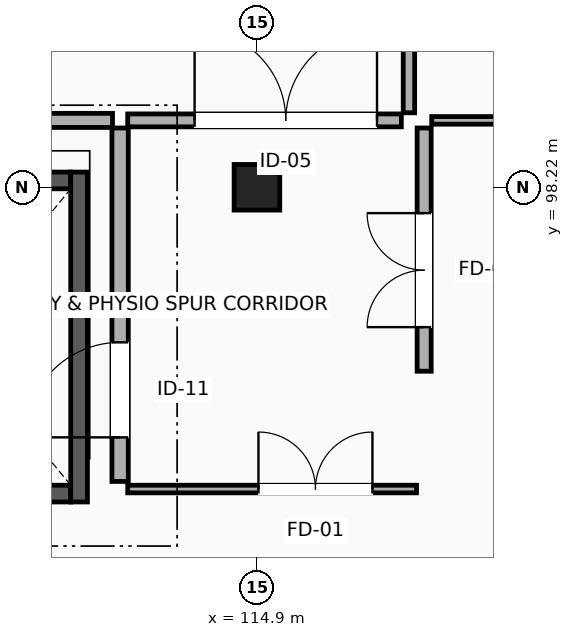
"""IFC4 building model, lengths in metres.
Left out: names, types, materials, properties, quantities, classifications, styles, units other than length and angle.
Written with IfcOpenShell. Run it as: python <this file> out.ifc"""

import sys

from ifc_helpers import new_model, si_unit, direction, frame, frame_2d, origin, origin_2d, place, context, subcontext, project, spatial, rectangle, extrude, element, fill, save


model = new_model("IFC4")
c1 = context("Model", 3, precision=1e-05, world=origin(), true_north=direction((0.0, 1.0)))
c2 = subcontext(c1, "Body", "Model", "MODEL_VIEW")
j1 = project(units=[si_unit("LENGTHUNIT", "METRE"), si_unit("PLANEANGLEUNIT", "RADIAN")], contexts=[c1])
p1 = place(None, origin())
s1 = spatial("IfcSite", under=j1, at=p1, CompositionType="ELEMENT")
p2 = place(p1, origin())
s2 = spatial("IfcBuilding", under=s1, at=p2, CompositionType="ELEMENT")
p3 = place(p2, frame((0.0, 0.0, 14.7)))
s3 = spatial("IfcBuildingStorey", under=s2, at=p3, CompositionType="ELEMENT", Elevation=14.7)
p4 = place(p3, frame((114.9, 98.22, 0.0), z_axis=(0.0, 0.0, 1.0), x_axis=(1.0, 0.0, 0.0)))
e1 = element("IfcColumn", 1, at=p4, inside=s3, PredefinedType="COLUMN", context=c2, shape_type="SweptSolid", body=[
    extrude(rectangle(XDim=0.6, YDim=0.6, at=origin_2d()), origin(), (0.0, 0.0, 1.0), 4.5),
])
p5 = place(p3, frame((109.25, 94.19, 0.0), z_axis=(0.0, 0.0, 1.0), x_axis=(1.0, 0.0, 0.0)))
e2 = element("IfcWall", 2, at=p5, inside=s3, PredefinedType="SOLIDWALL", context=c2, shape_type="SweptSolid", body=[
    extrude(rectangle(XDim=3.2, YDim=0.22, at=frame_2d((1.6, 0.0))), origin(), (0.0, 0.0, 1.0), 4.245),
])
p6 = place(p5, frame((0.5, 0.0, 0.0)))
e3 = element("IfcOpeningElement", 3, at=p6, cuts=e2, PredefinedType="OPENING", context=c2, shape_type="SweptSolid", body=[
    extrude(rectangle(XDim=2.2, YDim=2.6, at=frame_2d((1.1, 1.3))), frame((0.0, 0.12, 0.0), z_axis=(0.0, -1.0, 0.0), x_axis=(1.0, 0.0, 0.0)), (0.0, 0.0, 1.0), 0.24),
])
p7 = place(p3, frame((109.25, 98.31, 0.0), z_axis=(0.0, 0.0, 1.0), x_axis=(1.0, 0.0, 0.0)))
e4 = element("IfcWall", 4, at=p7, inside=s3, PredefinedType="SOLIDWALL", context=c2, shape_type="SweptSolid", body=[
    extrude(rectangle(XDim=3.2, YDim=0.22, at=frame_2d((1.6, 0.0))), origin(), (0.0, 0.0, 1.0), 3.427),
])
p8 = place(p3, frame((112.56, 94.08, 0.0), z_axis=(0.0, 0.0, 1.0), x_axis=(0.0, 1.0, 0.0)))
e5 = element("IfcWall", 5, at=p8, inside=s3, PredefinedType="SOLIDWALL", context=c2, shape_type="SweptSolid", body=[
    extrude(rectangle(XDim=4.34, YDim=0.22, at=frame_2d((2.17, 0.0))), origin(), (0.0, 0.0, 1.0), 3.427),
])
p9 = place(p3, frame((113.1, 94.35, 0.0), z_axis=(0.0, 0.0, 1.0), x_axis=(0.0, 1.0, 0.0)))
e6 = element("IfcWall", 6, at=p9, inside=s3, PredefinedType="PARTITIONING", context=c2, shape_type="SweptSolid", body=[
    extrude(rectangle(XDim=4.65, YDim=0.215, at=frame_2d((2.325, 0.0))), origin(), (0.0, 0.0, 1.0), 3.427),
])
p10 = place(p9, frame((0.58, 0.0, 0.0)))
e7 = element("IfcOpeningElement", 7, at=p10, cuts=e6, PredefinedType="OPENING", context=c2, shape_type="SweptSolid", body=[
    extrude(rectangle(XDim=1.25, YDim=2.15, at=frame_2d((0.625, 1.075))), frame((0.0, 0.117, 0.0), z_axis=(0.0, -1.0, 0.0), x_axis=(1.0, 0.0, 0.0)), (0.0, 0.0, 1.0), 0.235),
])
p11 = place(p3, frame((107.2, 99.1, 0.0), z_axis=(0.0, 0.0, 1.0), x_axis=(1.0, 0.0, 0.0)))
e8 = element("IfcWall", 8, at=p11, inside=s3, PredefinedType="PARTITIONING", context=c2, shape_type="SweptSolid", body=[
    extrude(rectangle(XDim=5.8, YDim=0.185, at=frame_2d((2.9, 0.0))), origin(), (0.0, 0.0, 1.0), 4.225),
])
p12 = place(p3, frame((113.2, 94.25, 0.0), z_axis=(0.0, 0.0, 1.0), x_axis=(1.0, 0.0, 0.0)))
e9 = element("IfcWall", 9, at=p12, inside=s3, PredefinedType="PARTITIONING", context=c2, shape_type="SweptSolid", body=[
    extrude(rectangle(XDim=3.8, YDim=0.1, at=frame_2d((1.9, 0.0))), origin(), (0.0, 0.0, 1.0), 3.917),
])
p13 = place(p12, frame((1.72, 0.0, 0.0)))
e10 = element("IfcOpeningElement", 10, at=p13, cuts=e9, PredefinedType="OPENING", context=c2, shape_type="SweptSolid", body=[
    extrude(rectangle(XDim=1.5, YDim=2.2, at=frame_2d((0.75, 1.1))), frame((0.0, 0.06, 0.0), z_axis=(0.0, -1.0, 0.0), x_axis=(1.0, 0.0, 0.0)), (0.0, 0.0, 1.0), 0.12),
])
p14 = place(p3, frame((117.1, 95.8, 0.0), z_axis=(0.0, 0.0, 1.0), x_axis=(0.0, 1.0, 0.0)))
e11 = element("IfcWall", 11, at=p14, inside=s3, PredefinedType="PARTITIONING", context=c2, shape_type="SweptSolid", body=[
    extrude(rectangle(XDim=3.2, YDim=0.185, at=frame_2d((1.6, 0.0))), origin(), (0.0, 0.0, 1.0), 3.727),
])
p15 = place(p14, frame((0.58, 0.0, 0.0)))
e12 = element("IfcOpeningElement", 12, at=p15, cuts=e11, PredefinedType="OPENING", context=c2, shape_type="SweptSolid", body=[
    extrude(rectangle(XDim=1.5, YDim=2.2, at=frame_2d((0.75, 1.1))), frame((0.0, 0.103, 0.0), z_axis=(0.0, -1.0, 0.0), x_axis=(1.0, 0.0, 0.0)), (0.0, 0.0, 1.0), 0.205),
])
p16 = place(p3, frame((113.2, 99.1, 0.0), z_axis=(0.0, 0.0, 1.0), x_axis=(1.0, 0.0, 0.0)))
e13 = element("IfcWall", 13, at=p16, inside=s3, PredefinedType="PARTITIONING", context=c2, shape_type="SweptSolid", body=[
    extrude(rectangle(XDim=3.6, YDim=0.17, at=frame_2d((1.8, 0.0))), origin(), (0.0, 0.0, 1.0), 3.577),
])
p17 = place(p16, frame((0.88, 0.0, 0.0)))
e14 = element("IfcOpeningElement", 14, at=p17, cuts=e13, PredefinedType="OPENING", context=c2, shape_type="SweptSolid", body=[
    extrude(rectangle(XDim=2.4, YDim=2.8, at=frame_2d((1.2, 1.4))), frame((0.0, 0.095, 0.0), z_axis=(0.0, -1.0, 0.0), x_axis=(1.0, 0.0, 0.0)), (0.0, 0.0, 1.0), 0.19),
])
p18 = place(p3, frame((117.2, 99.1, 0.0), z_axis=(0.0, 0.0, 1.0), x_axis=(1.0, 0.0, 0.0)))
e15 = element("IfcWall", 15, at=p18, inside=s3, PredefinedType="PARTITIONING", context=c2, shape_type="SweptSolid", body=[
    extrude(rectangle(XDim=4.4, YDim=0.1, at=frame_2d((2.2, 0.0))), origin(), (0.0, 0.0, 1.0), 3.827),
])
p19 = place(p18, frame((1.36, 0.0, 0.0)))
e16 = element("IfcOpeningElement", 16, at=p19, cuts=e15, PredefinedType="OPENING", context=c2, shape_type="SweptSolid", body=[
    extrude(rectangle(XDim=0.9, YDim=2.1, at=frame_2d((0.45, 1.05))), frame((0.0, 0.06, 0.0), z_axis=(0.0, -1.0, 0.0), x_axis=(1.0, 0.0, 0.0)), (0.0, 0.0, 1.0), 0.12),
])
p20 = place(p3, frame((116.9, 99.2, 0.0), z_axis=(0.0, 0.0, 1.0), x_axis=(0.0, 1.0, 0.0)))
e17 = element("IfcWall", 17, at=p20, inside=s3, PredefinedType="MOVABLE", context=c2, shape_type="SweptSolid", body=[
    extrude(rectangle(XDim=4.4, YDim=0.15, at=frame_2d((2.2, 0.0))), origin(), (0.0, 0.0, 1.0), 4.225),
])
p21 = place(p10, origin())
e18 = element("IfcDoor", 18, at=p21, inside=s3, OperationType="SINGLE_SWING_LEFT", PredefinedType="DOOR", context=c2, shape_type="SweptSolid", body=[
    extrude(rectangle(XDim=1.25, YDim=2.15, at=frame_2d((0.625, 1.075))), frame((0.0, 0.025, 0.0), z_axis=(0.0, -1.0, 0.0), x_axis=(1.0, 0.0, 0.0)), (0.0, 0.0, 1.0), 0.05),
])
fill(e7, e18)
p22 = place(p13, origin())
e19 = element("IfcDoor", 19, at=p22, inside=s3, OperationType="DOUBLE_DOOR_SINGLE_SWING", PredefinedType="DOOR", context=c2, shape_type="SweptSolid", body=[
    extrude(rectangle(XDim=1.5, YDim=2.2, at=frame_2d((0.75, 1.1))), frame((0.0, 0.025, 0.0), z_axis=(0.0, -1.0, 0.0), x_axis=(1.0, 0.0, 0.0)), (0.0, 0.0, 1.0), 0.05),
])
fill(e10, e19)
p23 = place(p15, origin())
e20 = element("IfcDoor", 20, at=p23, inside=s3, OperationType="DOUBLE_DOOR_SINGLE_SWING", PredefinedType="DOOR", context=c2, shape_type="SweptSolid", body=[
    extrude(rectangle(XDim=1.5, YDim=2.2, at=frame_2d((0.75, 1.1))), frame((0.0, 0.025, 0.0), z_axis=(0.0, -1.0, 0.0), x_axis=(1.0, 0.0, 0.0)), (0.0, 0.0, 1.0), 0.05),
])
fill(e12, e20)
p24 = place(p17, origin())
e21 = element("IfcDoor", 21, at=p24, inside=s3, OperationType="DOUBLE_DOOR_SINGLE_SWING", PredefinedType="DOOR", context=c2, shape_type="SweptSolid", body=[
    extrude(rectangle(XDim=2.4, YDim=2.8, at=frame_2d((1.2, 1.4))), frame((0.0, 0.025, 0.0), z_axis=(0.0, -1.0, 0.0), x_axis=(1.0, 0.0, 0.0)), (0.0, 0.0, 1.0), 0.05),
])
fill(e14, e21)
save(model, sys.argv[1])
